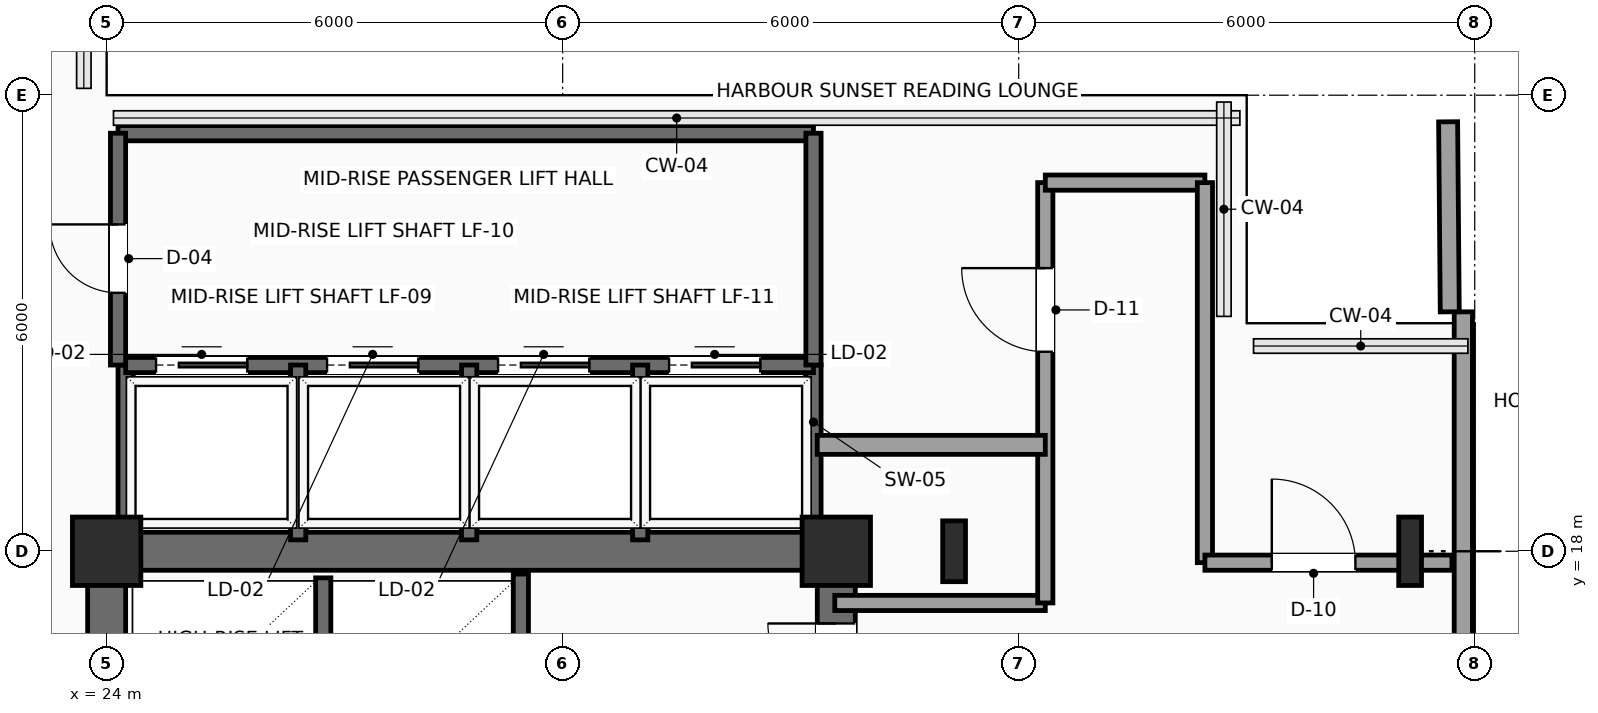
"""IFC4 building model, lengths in metres.
Left out: names, types, materials, properties, quantities, classifications, styles, units other than length and angle.
Written with IfcOpenShell. Run it as: python <this file> out.ifc"""

import sys

from ifc_helpers import new_model, si_unit, direction, frame, frame_2d, origin, origin_2d, place, context, subcontext, project, spatial, rectangle, i_section, extrude, element, fill, save


model = new_model("IFC4")
c1 = context("Model", 3, precision=1e-05, world=origin(), true_north=direction((0.0, 1.0)))
c2 = subcontext(c1, "Body", "Model", "MODEL_VIEW")
j1 = project(units=[si_unit("LENGTHUNIT", "METRE"), si_unit("PLANEANGLEUNIT", "RADIAN")], contexts=[c1])
p1 = place(None, origin())
s1 = spatial("IfcSite", under=j1, at=p1, CompositionType="ELEMENT")
p2 = place(p1, origin())
s2 = spatial("IfcBuilding", under=s1, at=p2, CompositionType="ELEMENT")
p3 = place(p2, frame((0.0, 0.0, 187.95)))
s3 = spatial("IfcBuildingStorey", under=s2, at=p3, CompositionType="ELEMENT", Elevation=187.95)
for number, where, z_axis, x_axis in (
    (1, (24.0, 18.0, 0.0), (0.0, 0.0, 1.0), (1.0, 0.0, 0.0)),
    (2, (33.6, 18.0, 0.0), (0.0, 0.0, 1.0), (1.0, 0.0, 0.0)),
):
    element("IfcColumn", number, at=place(p3, frame(where, z_axis=z_axis, x_axis=x_axis)), inside=s3, PredefinedType="COLUMN", context=c2, shape_type="SweptSolid", body=[
        extrude(rectangle(XDim=0.9, YDim=0.9, at=origin_2d()), origin(), (0.0, 0.0, 1.0), 3.75),
    ])
p4 = place(p3, frame((35.15, 18.0, 0.0), z_axis=(0.0, 0.0, 1.0), x_axis=(1.0, 0.0, 0.0)))
e3 = element("IfcColumn", 3, at=p4, inside=s3, PredefinedType="COLUMN", context=c2, shape_type="SweptSolid", body=[
    extrude(i_section(OverallWidth=0.3, OverallDepth=0.8, WebThickness=0.018, FlangeThickness=0.033, FilletRadius=0.03, at=origin_2d()), origin(), (0.0, 0.0, 1.0), 3.75),
])
p5 = place(p3, frame((41.15, 18.0, 0.0), z_axis=(0.0, 0.0, 1.0), x_axis=(1.0, 0.0, 0.0)))
e4 = element("IfcColumn", 4, at=p5, inside=s3, PredefinedType="COLUMN", context=c2, shape_type="SweptSolid", body=[
    extrude(i_section(OverallWidth=0.3, OverallDepth=0.9, WebThickness=0.019, FlangeThickness=0.035, FilletRadius=0.03, at=origin_2d()), origin(), (0.0, 0.0, 1.0), 3.75),
])
p6 = place(p3, frame((41.85, 21.15, 0.0), z_axis=(0.0, 0.0, 1.0), x_axis=(0.0, -1.0, 0.0)))
e5 = element("IfcWall", 5, at=p6, inside=s3, PredefinedType="SOLIDWALL", context=c2, shape_type="SweptSolid", body=[
    extrude(rectangle(XDim=18.3, YDim=0.24, at=frame_2d((9.15, 0.0))), origin(), (0.0, 0.0, 1.0), 3.54),
])
p7 = place(p3, frame((24.0, 18.0, 0.0), z_axis=(0.0, 0.0, 1.0), x_axis=(1.0, 0.0, 0.0)))
e6 = element("IfcWall", 6, at=p7, inside=s3, PredefinedType="SHEAR", context=c2, shape_type="SweptSolid", body=[
    extrude(rectangle(XDim=9.6, YDim=0.5, at=frame_2d((4.8, 0.0))), origin(), (0.0, 0.0, 1.0), 3.54),
])
p8 = place(p3, frame((24.0, 6.0, 0.0), z_axis=(0.0, 0.0, 1.0), x_axis=(0.0, 1.0, 0.0)))
e7 = element("IfcWall", 7, at=p8, inside=s3, PredefinedType="SHEAR", context=c2, shape_type="SweptSolid", body=[
    extrude(rectangle(XDim=12.0, YDim=0.5, at=frame_2d((6.0, 0.0))), origin(), (0.0, 0.0, 1.0), 3.54),
])
p9 = place(p8, frame((7.15, 0.0, 0.0)))
e8 = element("IfcOpeningElement", 8, at=p9, cuts=e7, PredefinedType="OPENING", context=c2, shape_type="SweptSolid", body=[
    extrude(rectangle(XDim=1.6, YDim=2.3, at=frame_2d((0.8, 1.15))), frame((0.0, 0.26, 0.0), z_axis=(0.0, -1.0, 0.0), x_axis=(1.0, 0.0, 0.0)), (0.0, 0.0, 1.0), 0.52),
])
p10 = place(p3, frame((33.6, 6.0, 0.0), z_axis=(0.0, 0.0, 1.0), x_axis=(0.0, 1.0, 0.0)))
e9 = element("IfcWall", 9, at=p10, inside=s3, PredefinedType="SHEAR", context=c2, shape_type="SweptSolid", body=[
    extrude(rectangle(XDim=12.0, YDim=0.5, at=frame_2d((6.0, 0.0))), origin(), (0.0, 0.0, 1.0), 3.54),
])
p11 = place(p10, frame((10.15, 0.0, 0.0)))
e10 = element("IfcOpeningElement", 10, at=p11, cuts=e9, PredefinedType="OPENING", context=c2, shape_type="SweptSolid", body=[
    extrude(rectangle(XDim=0.9, YDim=2.15, at=frame_2d((0.45, 1.075))), frame((0.0, 0.26, 0.0), z_axis=(0.0, -1.0, 0.0), x_axis=(1.0, 0.0, 0.0)), (0.0, 0.0, 1.0), 0.52),
])
p12 = place(p3, frame((26.85, 15.25, 0.0), z_axis=(0.0, 0.0, 1.0), x_axis=(0.0, 1.0, 0.0)))
e11 = element("IfcWall", 11, at=p12, inside=s3, PredefinedType="SHEAR", context=c2, shape_type="SweptSolid", body=[
    extrude(rectangle(XDim=2.4, YDim=0.2, at=frame_2d((1.2, 0.0))), origin(), (0.0, 0.0, 1.0), 3.54),
])
p13 = place(p3, frame((29.45, 15.25, 0.0), z_axis=(0.0, 0.0, 1.0), x_axis=(0.0, 1.0, 0.0)))
e12 = element("IfcWall", 12, at=p13, inside=s3, PredefinedType="SHEAR", context=c2, shape_type="SweptSolid", body=[
    extrude(rectangle(XDim=2.45, YDim=0.2, at=frame_2d((1.225, 0.0))), origin(), (0.0, 0.0, 1.0), 3.54),
])
for number, where, z_axis, x_axis in (
    (13, (33.3, 18.1, 0.0), (0.0, 0.0, 1.0), (0.0, 1.0, 0.0)),
    (14, (24.25, 18.1, 0.0), (0.0, 0.0, 1.0), (0.0, 1.0, 0.0)),
):
    element("IfcWall", number, at=place(p3, frame(where, z_axis=z_axis, x_axis=x_axis)), inside=s3, PredefinedType="SHEAR", context=c2, shape_type="SweptSolid", body=[
        extrude(rectangle(XDim=2.35, YDim=0.2, at=frame_2d((1.175, 0.0))), origin(), (0.0, 0.0, 1.0), 3.54),
    ])
p14 = place(p3, frame((24.25, 20.45, 0.0), z_axis=(0.0, 0.0, 1.0), x_axis=(1.0, 0.0, 0.0)))
e15 = element("IfcWall", 15, at=p14, inside=s3, PredefinedType="SHEAR", context=c2, shape_type="SweptSolid", body=[
    extrude(rectangle(XDim=9.05, YDim=0.2, at=frame_2d((4.525, 0.0))), origin(), (0.0, 0.0, 1.0), 3.54),
])
p15 = place(p14, frame((0.4, 0.0, 0.0)))
e16 = element("IfcOpeningElement", 16, at=p15, cuts=e15, PredefinedType="OPENING", context=c2, shape_type="SweptSolid", body=[
    extrude(rectangle(XDim=1.2, YDim=2.2, at=frame_2d((0.6, 1.1))), frame((0.0, 0.11, 0.0), z_axis=(0.0, -1.0, 0.0), x_axis=(1.0, 0.0, 0.0)), (0.0, 0.0, 1.0), 0.22),
])
p16 = place(p14, frame((2.65, 0.0, 0.0)))
e17 = element("IfcOpeningElement", 17, at=p16, cuts=e15, PredefinedType="OPENING", context=c2, shape_type="SweptSolid", body=[
    extrude(rectangle(XDim=1.2, YDim=2.2, at=frame_2d((0.6, 1.1))), frame((0.0, 0.11, 0.0), z_axis=(0.0, -1.0, 0.0), x_axis=(1.0, 0.0, 0.0)), (0.0, 0.0, 1.0), 0.22),
])
p17 = place(p14, frame((4.9, 0.0, 0.0)))
e18 = element("IfcOpeningElement", 18, at=p17, cuts=e15, PredefinedType="OPENING", context=c2, shape_type="SweptSolid", body=[
    extrude(rectangle(XDim=1.2, YDim=2.2, at=frame_2d((0.6, 1.1))), frame((0.0, 0.11, 0.0), z_axis=(0.0, -1.0, 0.0), x_axis=(1.0, 0.0, 0.0)), (0.0, 0.0, 1.0), 0.22),
])
p18 = place(p14, frame((7.15, 0.0, 0.0)))
e19 = element("IfcOpeningElement", 19, at=p18, cuts=e15, PredefinedType="OPENING", context=c2, shape_type="SweptSolid", body=[
    extrude(rectangle(XDim=1.2, YDim=2.2, at=frame_2d((0.6, 1.1))), frame((0.0, 0.11, 0.0), z_axis=(0.0, -1.0, 0.0), x_axis=(1.0, 0.0, 0.0)), (0.0, 0.0, 1.0), 0.22),
])
for number, where, z_axis, x_axis in (
    (20, (26.52, 18.15, 0.0), (0.0, 0.0, 1.0), (0.0, 1.0, 0.0)),
    (21, (28.77, 18.15, 0.0), (0.0, 0.0, 1.0), (0.0, 1.0, 0.0)),
    (22, (31.02, 18.15, 0.0), (0.0, 0.0, 1.0), (0.0, 1.0, 0.0)),
):
    element("IfcWall", number, at=place(p3, frame(where, z_axis=z_axis, x_axis=x_axis)), inside=s3, PredefinedType="SHEAR", context=c2, shape_type="SweptSolid", body=[
        extrude(rectangle(XDim=2.3, YDim=0.2, at=frame_2d((1.15, 0.0))), origin(), (0.0, 0.0, 1.0), 3.54),
    ])
p19 = place(p3, frame((24.15, 23.5, 0.0), z_axis=(0.0, 0.0, 1.0), x_axis=(1.0, 0.0, 0.0)))
e23 = element("IfcWall", 23, at=p19, inside=s3, PredefinedType="SHEAR", context=c2, shape_type="SweptSolid", body=[
    extrude(rectangle(XDim=9.15, YDim=0.2, at=frame_2d((4.575, 0.0))), origin(), (0.0, 0.0, 1.0), 3.54),
])
p20 = place(p3, frame((33.3, 20.45, 0.0), z_axis=(0.0, 0.0, 1.0), x_axis=(0.0, 1.0, 0.0)))
e24 = element("IfcWall", 24, at=p20, inside=s3, PredefinedType="SHEAR", context=c2, shape_type="SweptSolid", body=[
    extrude(rectangle(XDim=3.05, YDim=0.2, at=frame_2d((1.525, 0.0))), origin(), (0.0, 0.0, 1.0), 3.54),
])
p21 = place(p3, frame((24.15, 20.45, 0.0), z_axis=(0.0, 0.0, 1.0), x_axis=(0.0, 1.0, 0.0)))
e25 = element("IfcWall", 25, at=p21, inside=s3, PredefinedType="SHEAR", context=c2, shape_type="SweptSolid", body=[
    extrude(rectangle(XDim=3.05, YDim=0.2, at=frame_2d((1.525, 0.0))), origin(), (0.0, 0.0, 1.0), 3.54),
])
p22 = place(p21, frame((0.95, 0.0, 0.0)))
e26 = element("IfcOpeningElement", 26, at=p22, cuts=e25, PredefinedType="OPENING", context=c2, shape_type="SweptSolid", body=[
    extrude(rectangle(XDim=0.9, YDim=2.15, at=frame_2d((0.45, 1.075))), frame((0.0, 0.11, 0.0), z_axis=(0.0, -1.0, 0.0), x_axis=(1.0, 0.0, 0.0)), (0.0, 0.0, 1.0), 0.22),
])
p23 = place(p3, frame((33.58, 17.32, 0.0), z_axis=(0.0, 0.0, 1.0), x_axis=(1.0, 0.0, 0.0)))
e27 = element("IfcWall", 27, at=p23, inside=s3, PredefinedType="SOLIDWALL", context=c2, shape_type="SweptSolid", body=[
    extrude(rectangle(XDim=2.77, YDim=0.2, at=frame_2d((1.385, 0.0))), origin(), (0.0, 0.0, 1.0), 3.54),
])
p24 = place(p3, frame((36.35, 17.32, 0.0), z_axis=(0.0, 0.0, 1.0), x_axis=(0.0, 1.0, 0.0)))
e28 = element("IfcWall", 28, at=p24, inside=s3, PredefinedType="SOLIDWALL", context=c2, shape_type="SweptSolid", body=[
    extrude(rectangle(XDim=5.53, YDim=0.2, at=frame_2d((2.765, 0.0))), origin(), (0.0, 0.0, 1.0), 3.54),
])
p25 = place(p24, frame((3.305, 0.0, 0.0)))
e29 = element("IfcOpeningElement", 29, at=p25, cuts=e28, PredefinedType="OPENING", context=c2, shape_type="SweptSolid", body=[
    extrude(rectangle(XDim=1.1, YDim=2.25, at=frame_2d((0.55, 1.125))), frame((0.0, 0.11, 0.0), z_axis=(0.0, -1.0, 0.0), x_axis=(1.0, 0.0, 0.0)), (0.0, 0.0, 1.0), 0.22),
])
p26 = place(p3, frame((36.35, 22.85, 0.0), z_axis=(0.0, 0.0, 1.0), x_axis=(1.0, 0.0, 0.0)))
e30 = element("IfcWall", 30, at=p26, inside=s3, PredefinedType="SOLIDWALL", context=c2, shape_type="SweptSolid", body=[
    extrude(rectangle(XDim=2.1, YDim=0.2, at=frame_2d((1.05, 0.0))), origin(), (0.0, 0.0, 1.0), 3.54),
])
p27 = place(p3, frame((38.45, 22.85, 0.0), z_axis=(0.0, 0.0, 1.0), x_axis=(0.0, -1.0, 0.0)))
e31 = element("IfcWall", 31, at=p27, inside=s3, PredefinedType="SOLIDWALL", context=c2, shape_type="SweptSolid", body=[
    extrude(rectangle(XDim=5.0, YDim=0.2, at=frame_2d((2.5, 0.0))), origin(), (0.0, 0.0, 1.0), 3.54),
])
p28 = place(p3, frame((38.45, 17.85, 0.0), z_axis=(0.0, 0.0, 1.0), x_axis=(1.0, 0.0, 0.0)))
e32 = element("IfcWall", 32, at=p28, inside=s3, PredefinedType="SOLIDWALL", context=c2, shape_type="SweptSolid", body=[
    extrude(rectangle(XDim=3.25, YDim=0.2, at=frame_2d((1.625, 0.0))), origin(), (0.0, 0.0, 1.0), 3.132),
])
p29 = place(p28, frame((0.88, 0.0, 0.0)))
e33 = element("IfcOpeningElement", 33, at=p29, cuts=e32, PredefinedType="OPENING", context=c2, shape_type="SweptSolid", body=[
    extrude(rectangle(XDim=1.1, YDim=2.25, at=frame_2d((0.55, 1.125))), frame((0.0, 0.11, 0.0), z_axis=(0.0, -1.0, 0.0), x_axis=(1.0, 0.0, 0.0)), (0.0, 0.0, 1.0), 0.22),
])
p30 = place(p3, frame((41.672, 21.15, 0.0), z_axis=(0.0, 0.0, 1.0), x_axis=(-0.008691077992, 0.999962231868, 0.0)))
e34 = element("IfcWall", 34, at=p30, inside=s3, PredefinedType="PARTITIONING", context=c2, shape_type="SweptSolid", body=[
    extrude(rectangle(XDim=2.5, YDim=0.25, at=frame_2d((1.25, 0.0))), origin(), (0.0, 0.0, 1.0), 3.54),
])
p31 = place(p3, frame((33.35, 19.4, 0.0), z_axis=(0.0, 0.0, 1.0), x_axis=(1.0, 0.0, 0.0)))
e35 = element("IfcWall", 35, at=p31, inside=s3, PredefinedType="PARTITIONING", context=c2, shape_type="SweptSolid", body=[
    extrude(rectangle(XDim=3.0, YDim=0.25, at=frame_2d((1.5, 0.0))), origin(), (0.0, 0.0, 1.0), 3.54),
])
p32 = place(p11, origin())
e36 = element("IfcDoor", 36, at=p32, inside=s3, OperationType="SINGLE_SWING_RIGHT", PredefinedType="DOOR", context=c2, shape_type="SweptSolid", body=[
    extrude(rectangle(XDim=0.9, YDim=2.15, at=frame_2d((0.45, 1.075))), frame((0.0, 0.025, 0.0), z_axis=(0.0, -1.0, 0.0), x_axis=(1.0, 0.0, 0.0)), (0.0, 0.0, 1.0), 0.05),
])
fill(e10, e36)
p33 = place(p15, origin())
e37 = element("IfcDoor", 37, at=p33, inside=s3, OperationType="SLIDING_TO_RIGHT", PredefinedType="DOOR", context=c2, shape_type="SweptSolid", body=[
    extrude(rectangle(XDim=1.2, YDim=2.2, at=frame_2d((0.6, 1.1))), frame((0.0, 0.025, 0.0), z_axis=(0.0, -1.0, 0.0), x_axis=(1.0, 0.0, 0.0)), (0.0, 0.0, 1.0), 0.05),
])
fill(e16, e37)
p34 = place(p16, origin())
e38 = element("IfcDoor", 38, at=p34, inside=s3, OperationType="SLIDING_TO_RIGHT", PredefinedType="DOOR", context=c2, shape_type="SweptSolid", body=[
    extrude(rectangle(XDim=1.2, YDim=2.2, at=frame_2d((0.6, 1.1))), frame((0.0, 0.025, 0.0), z_axis=(0.0, -1.0, 0.0), x_axis=(1.0, 0.0, 0.0)), (0.0, 0.0, 1.0), 0.05),
])
fill(e17, e38)
p35 = place(p17, origin())
e39 = element("IfcDoor", 39, at=p35, inside=s3, OperationType="SLIDING_TO_RIGHT", PredefinedType="DOOR", context=c2, shape_type="SweptSolid", body=[
    extrude(rectangle(XDim=1.2, YDim=2.2, at=frame_2d((0.6, 1.1))), frame((0.0, 0.025, 0.0), z_axis=(0.0, -1.0, 0.0), x_axis=(1.0, 0.0, 0.0)), (0.0, 0.0, 1.0), 0.05),
])
fill(e18, e39)
p36 = place(p18, origin())
e40 = element("IfcDoor", 40, at=p36, inside=s3, OperationType="SLIDING_TO_RIGHT", PredefinedType="DOOR", context=c2, shape_type="SweptSolid", body=[
    extrude(rectangle(XDim=1.2, YDim=2.2, at=frame_2d((0.6, 1.1))), frame((0.0, 0.025, 0.0), z_axis=(0.0, -1.0, 0.0), x_axis=(1.0, 0.0, 0.0)), (0.0, 0.0, 1.0), 0.05),
])
fill(e19, e40)
p37 = place(p22, origin())
e41 = element("IfcDoor", 41, at=p37, inside=s3, OperationType="SINGLE_SWING_RIGHT", PredefinedType="DOOR", context=c2, shape_type="SweptSolid", body=[
    extrude(rectangle(XDim=0.9, YDim=2.15, at=frame_2d((0.45, 1.075))), frame((0.0, 0.025, 0.0), z_axis=(0.0, -1.0, 0.0), x_axis=(1.0, 0.0, 0.0)), (0.0, 0.0, 1.0), 0.05),
])
fill(e26, e41)
p38 = place(p25, origin())
e42 = element("IfcDoor", 42, at=p38, inside=s3, OperationType="SINGLE_SWING_RIGHT", PredefinedType="DOOR", context=c2, shape_type="SweptSolid", body=[
    extrude(rectangle(XDim=1.1, YDim=2.25, at=frame_2d((0.55, 1.125))), frame((0.0, 0.025, 0.0), z_axis=(0.0, -1.0, 0.0), x_axis=(1.0, 0.0, 0.0)), (0.0, 0.0, 1.0), 0.05),
])
fill(e29, e42)
p39 = place(p29, origin())
e43 = element("IfcDoor", 43, at=p39, inside=s3, OperationType="SINGLE_SWING_LEFT", PredefinedType="DOOR", context=c2, shape_type="SweptSolid", body=[
    extrude(rectangle(XDim=1.1, YDim=2.25, at=frame_2d((0.55, 1.125))), frame((0.0, 0.025, 0.0), z_axis=(0.0, -1.0, 0.0), x_axis=(1.0, 0.0, 0.0)), (0.0, 0.0, 1.0), 0.05),
])
fill(e33, e43)
save(model, sys.argv[1])
